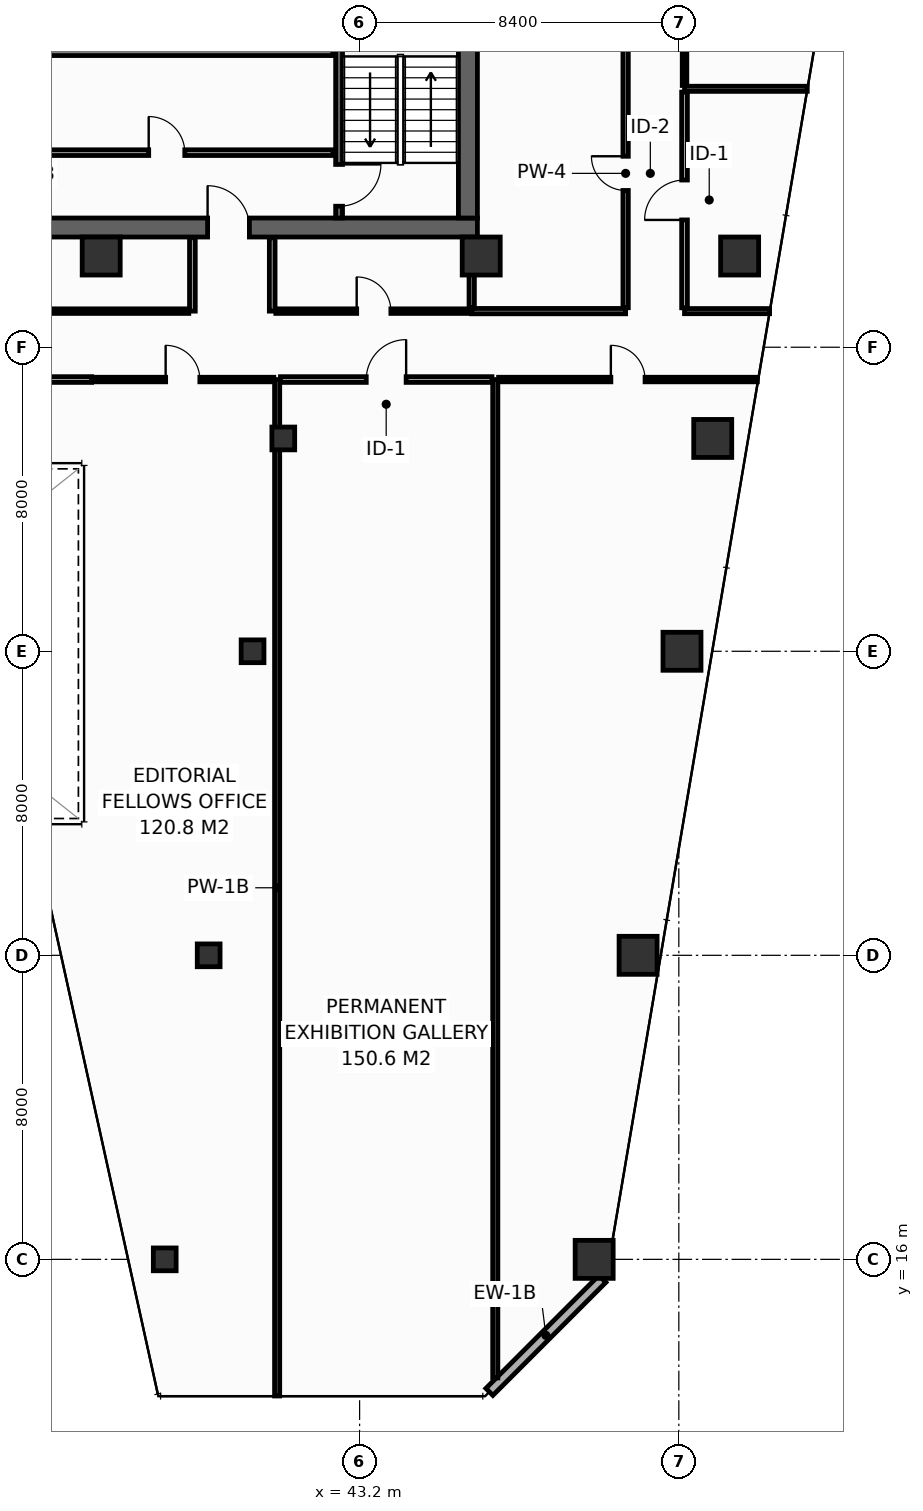
"""IFC4 building model, lengths in metres.
Left out: names, types, materials, properties, quantities, classifications, styles, units other than length and angle.
Written with IfcOpenShell. Run it as: python <this file> out.ifc"""

import sys

from ifc_helpers import new_model, si_unit, direction, frame, frame_2d, origin, origin_2d, place, context, subcontext, project, spatial, rectangle, hollow_rectangle, extrude, element, fill, save


model = new_model("IFC4")
c1 = context("Model", 3, precision=1e-05, world=origin(), true_north=direction((0.0, 1.0)))
c2 = subcontext(c1, "Body", "Model", "MODEL_VIEW")
j1 = project(units=[si_unit("LENGTHUNIT", "METRE"), si_unit("PLANEANGLEUNIT", "RADIAN")], contexts=[c1])
p1 = place(None, origin())
s1 = spatial("IfcSite", under=j1, at=p1, CompositionType="ELEMENT")
p2 = place(p1, origin())
s2 = spatial("IfcBuilding", under=s1, at=p2, CompositionType="ELEMENT")
p3 = place(p2, frame((0.0, 0.0, 179.0)))
s3 = spatial("IfcBuildingStorey", under=s2, at=p3, CompositionType="ELEMENT", Elevation=179.0)
p4 = place(p3, frame((13.6, 43.15, 0.0), z_axis=(0.0, 0.0, 1.0), x_axis=(1.0, 0.0, 0.0)))
e1 = element("IfcWall", 1, at=p4, inside=s3, PredefinedType="SHEAR", context=c2, shape_type="SweptSolid", body=[
    extrude(rectangle(XDim=32.7, YDim=0.5, at=frame_2d((16.35, 0.0))), origin(), (0.0, 0.0, 1.0), 3.55),
])
p5 = place(p4, frame((5.4, 0.0, 0.0)))
e2 = element("IfcOpeningElement", 2, at=p5, cuts=e1, PredefinedType="OPENING", context=c2, shape_type="SweptSolid", body=[
    extrude(rectangle(XDim=1.1, YDim=2.15, at=frame_2d((0.55, 1.075))), frame((0.0, 0.26, 0.0), z_axis=(0.0, -1.0, 0.0), x_axis=(1.0, 0.0, 0.0)), (0.0, 0.0, 1.0), 0.52),
])
p6 = place(p4, frame((25.6, 0.0, 0.0)))
e3 = element("IfcOpeningElement", 3, at=p6, cuts=e1, PredefinedType="OPENING", context=c2, shape_type="SweptSolid", body=[
    extrude(rectangle(XDim=1.1, YDim=2.15, at=frame_2d((0.55, 1.075))), frame((0.0, 0.26, 0.0), z_axis=(0.0, -1.0, 0.0), x_axis=(1.0, 0.0, 0.0)), (0.0, 0.0, 1.0), 0.52),
])
p7 = place(p3, frame((46.05, 43.4, 0.0), z_axis=(0.0, 0.0, 1.0), x_axis=(0.0, 1.0, 0.0)))
e4 = element("IfcWall", 4, at=p7, inside=s3, PredefinedType="SHEAR", context=c2, shape_type="SweptSolid", body=[
    extrude(rectangle(XDim=10.4, YDim=0.5, at=frame_2d((5.2, 0.0))), origin(), (0.0, 0.0, 1.0), 3.55),
])
for number, where, z_axis, x_axis in (
    (5, (36.4, 42.4, 0.0), (0.0, 0.0, 1.0), (1.0, 0.0, 0.0)),
    (6, (46.4, 42.4, 0.0), (0.0, 0.0, 1.0), (1.0, 0.0, 0.0)),
    (7, (53.2, 42.4, 0.0), (0.0, 0.0, 1.0), (1.0, 0.0, 0.0)),
    (8, (49.372, 16.0, 0.0), (0.0, 0.0, 1.0), (1.0, 0.0, 0.0)),
):
    element("IfcColumn", number, at=place(p3, frame(where, z_axis=z_axis, x_axis=x_axis)), inside=s3, PredefinedType="COLUMN", context=c2, shape_type="SweptSolid", body=[
        extrude(hollow_rectangle(XDim=1.0, YDim=1.0, WallThickness=0.045, at=origin_2d()), origin(), (0.0, 0.0, 1.0), 3.8),
    ])
p8 = place(p3, frame((38.072, 16.0, 0.0), z_axis=(0.0, 0.0, 1.0), x_axis=(1.0, 0.0, 0.0)))
e9 = element("IfcColumn", 9, at=p8, inside=s3, PredefinedType="COLUMN", context=c2, shape_type="SweptSolid", body=[
    extrude(hollow_rectangle(XDim=0.6, YDim=0.6, WallThickness=0.028, at=origin_2d()), origin(), (0.0, 0.0, 1.0), 3.8),
])
p9 = place(p3, frame((50.528, 24.0, 0.0), z_axis=(0.0, 0.0, 1.0), x_axis=(1.0, 0.0, 0.0)))
e10 = element("IfcColumn", 10, at=p9, inside=s3, PredefinedType="COLUMN", context=c2, shape_type="SweptSolid", body=[
    extrude(hollow_rectangle(XDim=1.0, YDim=1.0, WallThickness=0.045, at=origin_2d()), origin(), (0.0, 0.0, 1.0), 3.8),
])
p10 = place(p3, frame((39.228, 24.0, 0.0), z_axis=(0.0, 0.0, 1.0), x_axis=(1.0, 0.0, 0.0)))
e11 = element("IfcColumn", 11, at=p10, inside=s3, PredefinedType="COLUMN", context=c2, shape_type="SweptSolid", body=[
    extrude(hollow_rectangle(XDim=0.6, YDim=0.6, WallThickness=0.028, at=origin_2d()), origin(), (0.0, 0.0, 1.0), 3.8),
])
p11 = place(p3, frame((51.683, 32.0, 0.0), z_axis=(0.0, 0.0, 1.0), x_axis=(1.0, 0.0, 0.0)))
e12 = element("IfcColumn", 12, at=p11, inside=s3, PredefinedType="COLUMN", context=c2, shape_type="SweptSolid", body=[
    extrude(hollow_rectangle(XDim=1.0, YDim=1.0, WallThickness=0.045, at=origin_2d()), origin(), (0.0, 0.0, 1.0), 3.8),
])
p12 = place(p3, frame((40.383, 32.0, 0.0), z_axis=(0.0, 0.0, 1.0), x_axis=(1.0, 0.0, 0.0)))
e13 = element("IfcColumn", 13, at=p12, inside=s3, PredefinedType="COLUMN", context=c2, shape_type="SweptSolid", body=[
    extrude(hollow_rectangle(XDim=0.6, YDim=0.6, WallThickness=0.028, at=origin_2d()), origin(), (0.0, 0.0, 1.0), 3.8),
])
p13 = place(p3, frame((52.492, 37.6, 0.0), z_axis=(0.0, 0.0, 1.0), x_axis=(1.0, 0.0, 0.0)))
e14 = element("IfcColumn", 14, at=p13, inside=s3, PredefinedType="COLUMN", context=c2, shape_type="SweptSolid", body=[
    extrude(hollow_rectangle(XDim=1.0, YDim=1.0, WallThickness=0.045, at=origin_2d()), origin(), (0.0, 0.0, 1.0), 3.8),
])
p14 = place(p3, frame((41.192, 37.6, 0.0), z_axis=(0.0, 0.0, 1.0), x_axis=(1.0, 0.0, 0.0)))
e15 = element("IfcColumn", 15, at=p14, inside=s3, PredefinedType="COLUMN", context=c2, shape_type="SweptSolid", body=[
    extrude(hollow_rectangle(XDim=0.6, YDim=0.6, WallThickness=0.028, at=origin_2d()), origin(), (0.0, 0.0, 1.0), 3.8),
])
p15 = place(p3, frame((42.66, 53.8, 0.0), z_axis=(0.0, 0.0, 1.0), x_axis=(0.0, -1.0, 0.0)))
e16 = element("IfcWall", 16, at=p15, inside=s3, PredefinedType="SHEAR", context=c2, shape_type="SweptSolid", body=[
    extrude(rectangle(XDim=10.4, YDim=0.18, at=frame_2d((5.2, 0.0))), origin(), (0.0, 0.0, 1.0), 3.55),
])
p16 = place(p15, frame((8.99, 0.0, 0.0)))
e17 = element("IfcOpeningElement", 17, at=p16, cuts=e16, PredefinedType="OPENING", context=c2, shape_type="SweptSolid", body=[
    extrude(rectangle(XDim=1.1, YDim=2.15, at=frame_2d((0.55, 1.075))), frame((0.0, 0.1, 0.0), z_axis=(0.0, -1.0, 0.0), x_axis=(1.0, 0.0, 0.0)), (0.0, 0.0, 1.0), 0.2),
])
p17 = place(p3, frame((34.05, 45.12, 0.0), z_axis=(0.0, 0.0, 1.0), x_axis=(1.0, 0.0, 0.0)))
e18 = element("IfcWall", 18, at=p17, inside=s3, PredefinedType="PARTITIONING", context=c2, shape_type="SweptSolid", body=[
    extrude(rectangle(XDim=8.45, YDim=0.15, at=frame_2d((4.225, 0.0))), origin(), (0.0, 0.0, 1.0), 3.55),
])
p18 = place(p17, frame((3.6, 0.0, 0.0)))
e19 = element("IfcOpeningElement", 19, at=p18, cuts=e18, PredefinedType="OPENING", context=c2, shape_type="SweptSolid", body=[
    extrude(rectangle(XDim=0.95, YDim=2.15, at=frame_2d((0.475, 1.075))), frame((0.0, 0.085, 0.0), z_axis=(0.0, -1.0, 0.0), x_axis=(1.0, 0.0, 0.0)), (0.0, 0.0, 1.0), 0.17),
])
p19 = place(p3, frame((34.05, 47.75, 0.0), z_axis=(0.0, 0.0, 1.0), x_axis=(1.0, 0.0, 0.0)))
e20 = element("IfcWall", 20, at=p19, inside=s3, PredefinedType="PARTITIONING", context=c2, shape_type="SweptSolid", body=[
    extrude(rectangle(XDim=8.45, YDim=0.15, at=frame_2d((4.225, 0.0))), origin(), (0.0, 0.0, 1.0), 3.55),
])
p20 = place(p3, frame((46.615, 12.513, 0.0), z_axis=(0.0, 0.0, 1.0), x_axis=(0.707135806771, 0.70707775441, 0.0)))
e21 = element("IfcWall", 21, at=p20, inside=s3, PredefinedType="STANDARD", context=c2, shape_type="SweptSolid", body=[
    extrude(rectangle(XDim=4.206, YDim=0.26, at=frame_2d((2.103, 0.0))), origin(), (0.0, 0.0, 1.0), 3.55),
])
p21 = place(p3, frame((46.15, 40.95, 0.0), z_axis=(0.0, 0.0, 1.0), x_axis=(1.0, 0.0, 0.0)))
e22 = element("IfcWall", 22, at=p21, inside=s3, PredefinedType="PARTITIONING", context=c2, shape_type="SweptSolid", body=[
    extrude(rectangle(XDim=4.05, YDim=0.14, at=frame_2d((2.025, 0.0))), origin(), (0.0, 0.0, 1.0), 3.55),
])
p22 = place(p3, frame((46.15, 41.04, 0.0), z_axis=(0.0, 0.0, 1.0), x_axis=(0.0, 1.0, 0.0)))
e23 = element("IfcWall", 23, at=p22, inside=s3, PredefinedType="PARTITIONING", context=c2, shape_type="SweptSolid", body=[
    extrude(rectangle(XDim=1.84, YDim=0.14, at=frame_2d((0.92, 0.0))), origin(), (0.0, 0.0, 1.0), 3.55),
])
p23 = place(p3, frame((50.2, 41.04, 0.0), z_axis=(0.0, 0.0, 1.0), x_axis=(0.0, 1.0, 0.0)))
e24 = element("IfcWall", 24, at=p23, inside=s3, PredefinedType="PARTITIONING", context=c2, shape_type="SweptSolid", body=[
    extrude(rectangle(XDim=7.07, YDim=0.14, at=frame_2d((3.535, 0.0))), origin(), (0.0, 0.0, 1.0), 2.835),
])
p24 = place(p23, frame((3.085, 0.0, 0.0)))
e25 = element("IfcOpeningElement", 25, at=p24, cuts=e24, PredefinedType="OPENING", context=c2, shape_type="SweptSolid", body=[
    extrude(rectangle(XDim=0.9, YDim=2.1, at=frame_2d((0.45, 1.05))), frame((0.0, 0.08, 0.0), z_axis=(0.0, -1.0, 0.0), x_axis=(1.0, 0.0, 0.0)), (0.0, 0.0, 1.0), 0.16),
])
p25 = place(p3, frame((51.75, 40.95, 0.0), z_axis=(0.0, 0.0, 1.0), x_axis=(1.0, 0.0, 0.0)))
e26 = element("IfcWall", 26, at=p25, inside=s3, PredefinedType="PARTITIONING", context=c2, shape_type="SweptSolid", body=[
    extrude(rectangle(XDim=2.239, YDim=0.135, at=frame_2d((1.119, 0.0))), origin(), (0.0, 0.0, 1.0), 3.035),
])
p26 = place(p3, frame((51.75, 46.8, 0.0), z_axis=(0.0, 0.0, 1.0), x_axis=(1.0, 0.0, 0.0)))
e27 = element("IfcWall", 27, at=p26, inside=s3, PredefinedType="PARTITIONING", context=c2, shape_type="SweptSolid", body=[
    extrude(rectangle(XDim=3.229, YDim=0.135, at=frame_2d((1.615, 0.0))), origin(), (0.0, 0.0, 1.0), 2.835),
])
p27 = place(p3, frame((51.75, 41.038, 0.0), z_axis=(0.0, 0.0, 1.0), x_axis=(0.0, 1.0, 0.0)))
e28 = element("IfcWall", 28, at=p27, inside=s3, PredefinedType="PARTITIONING", context=c2, shape_type="SweptSolid", body=[
    extrude(rectangle(XDim=5.675, YDim=0.15, at=frame_2d((2.837, 0.0))), origin(), (0.0, 0.0, 1.0), 2.835),
])
p28 = place(p27, frame((2.312, 0.0, 0.0)))
e29 = element("IfcOpeningElement", 29, at=p28, cuts=e28, PredefinedType="OPENING", context=c2, shape_type="SweptSolid", body=[
    extrude(rectangle(XDim=1.05, YDim=2.15, at=frame_2d((0.525, 1.075))), frame((0.0, 0.085, 0.0), z_axis=(0.0, -1.0, 0.0), x_axis=(1.0, 0.0, 0.0)), (0.0, 0.0, 1.0), 0.17),
])
p29 = place(p3, frame((51.75, 46.887, 0.0), z_axis=(0.0, 0.0, 1.0), x_axis=(0.0, 1.0, 0.0)))
e30 = element("IfcWall", 30, at=p29, inside=s3, PredefinedType="PARTITIONING", context=c2, shape_type="SweptSolid", body=[
    extrude(rectangle(XDim=4.425, YDim=0.12, at=frame_2d((2.212, 0.0))), origin(), (0.0, 0.0, 1.0), 3.55),
])
p30 = place(p29, frame((1.762, 0.0, 0.0)))
e31 = element("IfcOpeningElement", 31, at=p30, cuts=e30, PredefinedType="OPENING", context=c2, shape_type="SweptSolid", body=[
    extrude(rectangle(XDim=0.9, YDim=2.1, at=frame_2d((0.45, 1.05))), frame((0.0, 0.07, 0.0), z_axis=(0.0, -1.0, 0.0), x_axis=(1.0, 0.0, 0.0)), (0.0, 0.0, 1.0), 0.14),
])
for number, where, z_axis, x_axis in (
    (32, (38.8, 40.95, 0.0), (0.0, 0.0, 1.0), (0.0, 1.0, 0.0)),
    (33, (40.9, 40.95, 0.0), (0.0, 0.0, 1.0), (0.0, 1.0, 0.0)),
):
    element("IfcWall", number, at=place(p3, frame(where, z_axis=z_axis, x_axis=x_axis)), inside=s3, PredefinedType="PARTITIONING", context=c2, shape_type="SweptSolid", body=[
        extrude(rectangle(XDim=1.93, YDim=0.15, at=frame_2d((0.965, 0.0))), origin(), (0.0, 0.0, 1.0), 3.55),
    ])
p31 = place(p3, frame((30.08, 40.95, 0.0), z_axis=(0.0, 0.0, 1.0), x_axis=(1.0, 0.0, 0.0)))
e34 = element("IfcWall", 34, at=p31, inside=s3, PredefinedType="PARTITIONING", context=c2, shape_type="SweptSolid", body=[
    extrude(rectangle(XDim=8.625, YDim=0.12, at=frame_2d((4.312, 0.0))), origin(), (0.0, 0.0, 1.0), 2.835),
])
p32 = place(p31, frame((3.862, 0.0, 0.0)))
e35 = element("IfcOpeningElement", 35, at=p32, cuts=e34, PredefinedType="OPENING", context=c2, shape_type="SweptSolid", body=[
    extrude(rectangle(XDim=0.9, YDim=2.1, at=frame_2d((0.45, 1.05))), frame((0.0, 0.07, 0.0), z_axis=(0.0, -1.0, 0.0), x_axis=(1.0, 0.0, 0.0)), (0.0, 0.0, 1.0), 0.14),
])
p33 = place(p3, frame((40.995, 40.95, 0.0), z_axis=(0.0, 0.0, 1.0), x_axis=(1.0, 0.0, 0.0)))
e36 = element("IfcWall", 36, at=p33, inside=s3, PredefinedType="PARTITIONING", context=c2, shape_type="SweptSolid", body=[
    extrude(rectangle(XDim=5.155, YDim=0.12, at=frame_2d((2.577, 0.0))), origin(), (0.0, 0.0, 1.0), 3.55),
])
p34 = place(p33, frame((2.128, 0.0, 0.0)))
e37 = element("IfcOpeningElement", 37, at=p34, cuts=e36, PredefinedType="OPENING", context=c2, shape_type="SweptSolid", body=[
    extrude(rectangle(XDim=0.9, YDim=2.1, at=frame_2d((0.45, 1.05))), frame((0.0, 0.07, 0.0), z_axis=(0.0, -1.0, 0.0), x_axis=(1.0, 0.0, 0.0)), (0.0, 0.0, 1.0), 0.14),
])
p35 = place(p3, frame((41.03, 12.405, 0.0), z_axis=(0.0, 0.0, 1.0), x_axis=(0.0, 1.0, 0.0)))
e38 = element("IfcWall", 38, at=p35, inside=s3, PredefinedType="PARTITIONING", context=c2, shape_type="SweptSolid", body=[
    extrude(rectangle(XDim=26.745, YDim=0.135, at=frame_2d((13.373, 0.0))), origin(), (0.0, 0.0, 1.0), 2.835),
])
p36 = place(p3, frame((46.77, 12.88, 0.0), z_axis=(0.0, 0.0, 1.0), x_axis=(0.0, 1.0, 0.0)))
e39 = element("IfcWall", 39, at=p36, inside=s3, PredefinedType="PARTITIONING", context=c2, shape_type="SweptSolid", body=[
    extrude(rectangle(XDim=26.27, YDim=0.135, at=frame_2d((13.135, 0.0))), origin(), (0.0, 0.0, 1.0), 2.835),
])
p37 = place(p3, frame((23.85, 39.15, 0.0), z_axis=(0.0, 0.0, 1.0), x_axis=(1.0, 0.0, 0.0)))
e40 = element("IfcWall", 40, at=p37, inside=s3, PredefinedType="PARTITIONING", context=c2, shape_type="SweptSolid", body=[
    extrude(rectangle(XDim=12.3, YDim=0.15, at=frame_2d((6.15, 0.0))), origin(), (0.0, 0.0, 1.0), 3.55),
])
p38 = place(p3, frame((36.15, 39.15, 0.0), z_axis=(0.0, 0.0, 1.0), x_axis=(1.0, 0.0, 0.0)))
e41 = element("IfcWall", 41, at=p38, inside=s3, PredefinedType="PARTITIONING", context=c2, shape_type="SweptSolid", body=[
    extrude(rectangle(XDim=4.792, YDim=0.12, at=frame_2d((2.396, 0.0))), origin(), (0.0, 0.0, 1.0), 2.835),
])
p39 = place(p38, frame((1.946, 0.0, 0.0)))
e42 = element("IfcOpeningElement", 42, at=p39, cuts=e41, PredefinedType="OPENING", context=c2, shape_type="SweptSolid", body=[
    extrude(rectangle(XDim=0.9, YDim=2.1, at=frame_2d((0.45, 1.05))), frame((0.0, 0.07, 0.0), z_axis=(0.0, -1.0, 0.0), x_axis=(1.0, 0.0, 0.0)), (0.0, 0.0, 1.0), 0.14),
])
p40 = place(p3, frame((41.117, 39.15, 0.0), z_axis=(0.0, 0.0, 1.0), x_axis=(1.0, 0.0, 0.0)))
e43 = element("IfcWall", 43, at=p40, inside=s3, PredefinedType="PARTITIONING", context=c2, shape_type="SweptSolid", body=[
    extrude(rectangle(XDim=5.565, YDim=0.15, at=frame_2d((2.783, 0.0))), origin(), (0.0, 0.0, 1.0), 3.55),
])
p41 = place(p40, frame((2.257, 0.0, 0.0)))
e44 = element("IfcOpeningElement", 44, at=p41, cuts=e43, PredefinedType="OPENING", context=c2, shape_type="SweptSolid", body=[
    extrude(rectangle(XDim=1.05, YDim=2.15, at=frame_2d((0.525, 1.075))), frame((0.0, 0.085, 0.0), z_axis=(0.0, -1.0, 0.0), x_axis=(1.0, 0.0, 0.0)), (0.0, 0.0, 1.0), 0.17),
])
p42 = place(p3, frame((46.857, 39.15, 0.0), z_axis=(0.0, 0.0, 1.0), x_axis=(1.0, 0.0, 0.0)))
e45 = element("IfcWall", 45, at=p42, inside=s3, PredefinedType="PARTITIONING", context=c2, shape_type="SweptSolid", body=[
    extrude(rectangle(XDim=6.809, YDim=0.12, at=frame_2d((3.404, 0.0))), origin(), (0.0, 0.0, 1.0), 3.035),
])
p43 = place(p42, frame((2.954, 0.0, 0.0)))
e46 = element("IfcOpeningElement", 46, at=p43, cuts=e45, PredefinedType="OPENING", context=c2, shape_type="SweptSolid", body=[
    extrude(rectangle(XDim=0.9, YDim=2.1, at=frame_2d((0.45, 1.05))), frame((0.0, 0.07, 0.0), z_axis=(0.0, -1.0, 0.0), x_axis=(1.0, 0.0, 0.0)), (0.0, 0.0, 1.0), 0.14),
])
p44 = place(p16, origin())
e47 = element("IfcDoor", 47, at=p44, inside=s3, OperationType="SINGLE_SWING_LEFT", PredefinedType="DOOR", context=c2, shape_type="SweptSolid", body=[
    extrude(rectangle(XDim=1.1, YDim=2.15, at=frame_2d((0.55, 1.075))), frame((0.0, 0.025, 0.0), z_axis=(0.0, -1.0, 0.0), x_axis=(1.0, 0.0, 0.0)), (0.0, 0.0, 1.0), 0.05),
])
fill(e17, e47)
p45 = place(p6, origin())
e48 = element("IfcDoor", 48, at=p45, inside=s3, OperationType="SINGLE_SWING_LEFT", PredefinedType="DOOR", context=c2, shape_type="SweptSolid", body=[
    extrude(rectangle(XDim=1.1, YDim=2.15, at=frame_2d((0.55, 1.075))), frame((0.0, 0.025, 0.0), z_axis=(0.0, -1.0, 0.0), x_axis=(1.0, 0.0, 0.0)), (0.0, 0.0, 1.0), 0.05),
])
fill(e3, e48)
p46 = place(p18, origin())
e49 = element("IfcDoor", 49, at=p46, inside=s3, OperationType="SINGLE_SWING_LEFT", PredefinedType="DOOR", context=c2, shape_type="SweptSolid", body=[
    extrude(rectangle(XDim=0.95, YDim=2.15, at=frame_2d((0.475, 1.075))), frame((0.0, 0.025, 0.0), z_axis=(0.0, -1.0, 0.0), x_axis=(1.0, 0.0, 0.0)), (0.0, 0.0, 1.0), 0.05),
])
fill(e19, e49)
p47 = place(p24, origin())
e50 = element("IfcDoor", 50, at=p47, inside=s3, OperationType="SINGLE_SWING_RIGHT", PredefinedType="DOOR", context=c2, shape_type="SweptSolid", body=[
    extrude(rectangle(XDim=0.9, YDim=2.1, at=frame_2d((0.45, 1.05))), frame((0.0, 0.025, 0.0), z_axis=(0.0, -1.0, 0.0), x_axis=(1.0, 0.0, 0.0)), (0.0, 0.0, 1.0), 0.05),
])
fill(e25, e50)
p48 = place(p28, origin())
e51 = element("IfcDoor", 51, at=p48, inside=s3, OperationType="SINGLE_SWING_LEFT", PredefinedType="DOOR", context=c2, shape_type="SweptSolid", body=[
    extrude(rectangle(XDim=1.05, YDim=2.15, at=frame_2d((0.525, 1.075))), frame((0.0, 0.025, 0.0), z_axis=(0.0, -1.0, 0.0), x_axis=(1.0, 0.0, 0.0)), (0.0, 0.0, 1.0), 0.05),
])
fill(e29, e51)
p49 = place(p34, origin())
e52 = element("IfcDoor", 52, at=p49, inside=s3, OperationType="SINGLE_SWING_LEFT", PredefinedType="DOOR", context=c2, shape_type="SweptSolid", body=[
    extrude(rectangle(XDim=0.9, YDim=2.1, at=frame_2d((0.45, 1.05))), frame((0.0, 0.025, 0.0), z_axis=(0.0, -1.0, 0.0), x_axis=(1.0, 0.0, 0.0)), (0.0, 0.0, 1.0), 0.05),
])
fill(e37, e52)
p50 = place(p39, origin())
e53 = element("IfcDoor", 53, at=p50, inside=s3, OperationType="SINGLE_SWING_LEFT", PredefinedType="DOOR", context=c2, shape_type="SweptSolid", body=[
    extrude(rectangle(XDim=0.9, YDim=2.1, at=frame_2d((0.45, 1.05))), frame((0.0, 0.025, 0.0), z_axis=(0.0, -1.0, 0.0), x_axis=(1.0, 0.0, 0.0)), (0.0, 0.0, 1.0), 0.05),
])
fill(e42, e53)
p51 = place(p41, origin())
e54 = element("IfcDoor", 54, at=p51, inside=s3, OperationType="SINGLE_SWING_RIGHT", PredefinedType="DOOR", context=c2, shape_type="SweptSolid", body=[
    extrude(rectangle(XDim=1.05, YDim=2.15, at=frame_2d((0.525, 1.075))), frame((0.0, 0.025, 0.0), z_axis=(0.0, -1.0, 0.0), x_axis=(1.0, 0.0, 0.0)), (0.0, 0.0, 1.0), 0.05),
])
fill(e44, e54)
p52 = place(p43, origin())
e55 = element("IfcDoor", 55, at=p52, inside=s3, OperationType="SINGLE_SWING_LEFT", PredefinedType="DOOR", context=c2, shape_type="SweptSolid", body=[
    extrude(rectangle(XDim=0.9, YDim=2.1, at=frame_2d((0.45, 1.05))), frame((0.0, 0.025, 0.0), z_axis=(0.0, -1.0, 0.0), x_axis=(1.0, 0.0, 0.0)), (0.0, 0.0, 1.0), 0.05),
])
fill(e46, e55)
save(model, sys.argv[1])
